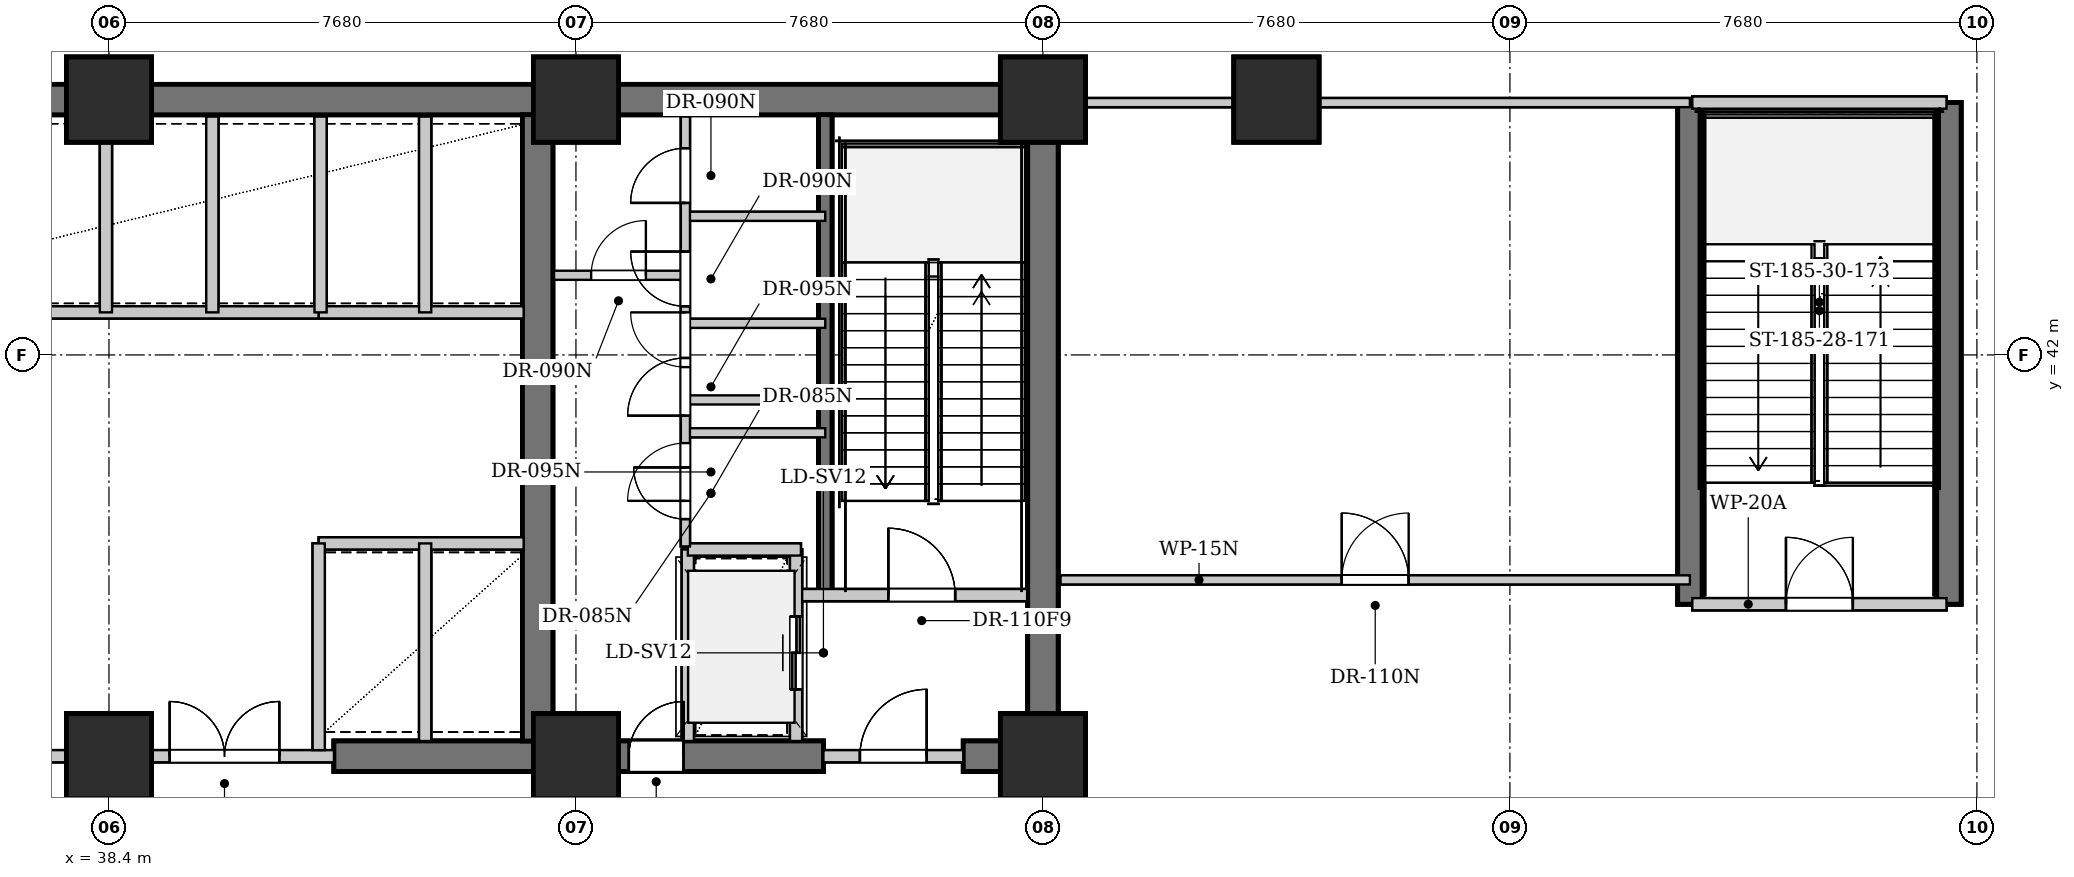
"""IFC4 building model, lengths in metres.
Left out: names, types, materials, properties, quantities, classifications, styles, units other than length and angle.
Written with IfcOpenShell. Run it as: python <this file> out.ifc"""

import sys

from ifc_helpers import new_model, si_unit, direction, frame, frame_2d, origin, origin_2d, place, context, subcontext, project, spatial, rectangle, extrude, element, fill, save


model = new_model("IFC4")
c1 = context("Model", 3, precision=1e-05, world=origin(), true_north=direction((0.0, 1.0)))
c2 = subcontext(c1, "Body", "Model", "MODEL_VIEW")
j1 = project(units=[si_unit("LENGTHUNIT", "METRE"), si_unit("PLANEANGLEUNIT", "RADIAN")], contexts=[c1])
p1 = place(None, origin())
s1 = spatial("IfcSite", under=j1, at=p1, CompositionType="ELEMENT")
p2 = place(p1, origin())
s2 = spatial("IfcBuilding", under=s1, at=p2, CompositionType="ELEMENT")
p3 = place(p2, frame((0.0, 0.0, 10.4)))
s3 = spatial("IfcBuildingStorey", under=s2, at=p3, CompositionType="ELEMENT", Elevation=10.4)
p4 = place(p3, frame((22.79, 46.2, 0.0), z_axis=(0.0, 0.0, 1.0), x_axis=(1.0, 0.0, 0.0)))
e1 = element("IfcWall", 1, at=p4, inside=s3, PredefinedType="SHEAR", context=c2, shape_type="SweptSolid", body=[
    extrude(rectangle(XDim=31.22, YDim=0.5, at=frame_2d((15.61, 0.0))), origin(), (0.0, 0.0, 1.0), 4.94),
])
p5 = place(p3, frame((42.1, 35.4, 0.0), z_axis=(0.0, 0.0, 1.0), x_axis=(1.0, 0.0, 0.0)))
e2 = element("IfcWall", 2, at=p5, inside=s3, PredefinedType="SHEAR", context=c2, shape_type="SweptSolid", body=[
    extrude(rectangle(XDim=8.05, YDim=0.5, at=frame_2d((4.025, 0.0))), origin(), (0.0, 0.0, 1.0), 4.94),
])
p6 = place(p5, frame((4.85, 0.0, 0.0)))
e3 = element("IfcOpeningElement", 3, at=p6, cuts=e2, PredefinedType="OPENING", context=c2, shape_type="SweptSolid", body=[
    extrude(rectangle(XDim=0.9, YDim=2.15, at=frame_2d((0.45, 1.075))), frame((0.0, 0.26, 0.0), z_axis=(0.0, -1.0, 0.0), x_axis=(1.0, 0.0, 0.0)), (0.0, 0.0, 1.0), 0.52),
])
p7 = place(p3, frame((52.45, 35.4, 0.0), z_axis=(0.0, 0.0, 1.0), x_axis=(1.0, 0.0, 0.0)))
e4 = element("IfcWall", 4, at=p7, inside=s3, PredefinedType="SHEAR", context=c2, shape_type="SweptSolid", body=[
    extrude(rectangle(XDim=1.56, YDim=0.5, at=frame_2d((0.78, 0.0))), origin(), (0.0, 0.0, 1.0), 4.94),
])
for number, where, z_axis, x_axis in (
    (5, (45.45, 35.65, 0.0), (0.0, 0.0, 1.0), (0.0, 1.0, 0.0)),
    (6, (53.76, 35.65, 0.0), (0.0, 0.0, 1.0), (0.0, 1.0, 0.0)),
):
    element("IfcWall", number, at=place(p3, frame(where, z_axis=z_axis, x_axis=x_axis)), inside=s3, PredefinedType="SHEAR", context=c2, shape_type="SweptSolid", body=[
        extrude(rectangle(XDim=10.3, YDim=0.5, at=frame_2d((5.15, 0.0))), origin(), (0.0, 0.0, 1.0), 4.94),
    ])
p8 = place(p3, frame((50.18, 38.05, 0.0), z_axis=(0.0, 0.0, 1.0), x_axis=(0.0, 1.0, 0.0)))
e7 = element("IfcWall", 7, at=p8, inside=s3, PredefinedType="SHEAR", context=c2, shape_type="SweptSolid", body=[
    extrude(rectangle(XDim=7.9, YDim=0.22, at=frame_2d((3.95, 0.0))), origin(), (0.0, 0.0, 1.0), 4.94),
])
for number, where, z_axis, x_axis in (
    (8, (64.4, 37.9, 0.0), (0.0, 0.0, 1.0), (0.0, 1.0, 0.0)),
    (9, (68.66, 37.9, 0.0), (0.0, 0.0, 1.0), (0.0, 1.0, 0.0)),
):
    element("IfcWall", number, at=place(p3, frame(where, z_axis=z_axis, x_axis=x_axis)), inside=s3, PredefinedType="SHEAR", context=c2, shape_type="SweptSolid", body=[
        extrude(rectangle(XDim=8.25, YDim=0.4, at=frame_2d((4.125, 0.0))), origin(), (0.0, 0.0, 1.0), 4.94),
    ])
for number, where, z_axis, x_axis in (
    (10, (38.4, 35.4, 0.0), (0.0, 0.0, 1.0), (1.0, 0.0, 0.0)),
    (11, (38.4, 46.2, 0.0), (0.0, 0.0, 1.0), (1.0, 0.0, 0.0)),
    (12, (46.08, 35.4, 0.0), (0.0, 0.0, 1.0), (1.0, 0.0, 0.0)),
    (13, (46.08, 46.2, 0.0), (0.0, 0.0, 1.0), (1.0, 0.0, 0.0)),
    (14, (53.76, 35.4, 0.0), (0.0, 0.0, 1.0), (1.0, 0.0, 0.0)),
    (15, (53.76, 46.2, 0.0), (0.0, 0.0, 1.0), (1.0, 0.0, 0.0)),
    (16, (57.6, 46.2, 0.0), (0.0, 0.0, 1.0), (1.0, 0.0, 0.0)),
):
    element("IfcColumn", number, at=place(p3, frame(where, z_axis=z_axis, x_axis=x_axis)), inside=s3, PredefinedType="COLUMN", context=c2, shape_type="SweptSolid", body=[
        extrude(rectangle(XDim=1.4, YDim=1.4, at=origin_2d()), origin(), (0.0, 0.0, 1.0), 5.2),
    ])
p9 = place(p3, frame((35.6, 35.4, 0.0), z_axis=(0.0, 0.0, 1.0), x_axis=(1.0, 0.0, 0.0)))
e17 = element("IfcWall", 17, at=p9, inside=s3, PredefinedType="PARTITIONING", context=c2, shape_type="SweptSolid", body=[
    extrude(rectangle(XDim=6.5, YDim=0.2, at=frame_2d((3.25, 0.0))), origin(), (0.0, 0.0, 1.0), 4.035),
])
p10 = place(p9, frame((3.8, 0.0, 0.0)))
e18 = element("IfcOpeningElement", 18, at=p10, cuts=e17, PredefinedType="OPENING", context=c2, shape_type="SweptSolid", body=[
    extrude(rectangle(XDim=1.8, YDim=2.3, at=frame_2d((0.9, 1.15))), frame((0.0, 0.11, 0.0), z_axis=(0.0, -1.0, 0.0), x_axis=(1.0, 0.0, 0.0)), (0.0, 0.0, 1.0), 0.22),
])
p11 = place(p3, frame((36.6, 42.7, 0.0), z_axis=(0.0, 0.0, 1.0), x_axis=(1.0, 0.0, 0.0)))
e19 = element("IfcWall", 19, at=p11, inside=s3, PredefinedType="PARTITIONING", context=c2, shape_type="SweptSolid", body=[
    extrude(rectangle(XDim=5.25, YDim=0.2, at=frame_2d((2.625, 0.0))), origin(), (0.0, 0.0, 1.0), 4.94),
])
p12 = place(p3, frame((38.35, 42.7, 0.0), z_axis=(0.0, 0.0, 1.0), x_axis=(0.0, 1.0, 0.0)))
e20 = element("IfcWall", 20, at=p12, inside=s3, PredefinedType="PARTITIONING", context=c2, shape_type="SweptSolid", body=[
    extrude(rectangle(XDim=3.22, YDim=0.2, at=frame_2d((1.61, 0.0))), origin(), (0.0, 0.0, 1.0), 4.035),
])
p13 = place(p3, frame((40.1, 42.7, 0.0), z_axis=(0.0, 0.0, 1.0), x_axis=(0.0, 1.0, 0.0)))
e21 = element("IfcWall", 21, at=p13, inside=s3, PredefinedType="PARTITIONING", context=c2, shape_type="SweptSolid", body=[
    extrude(rectangle(XDim=3.22, YDim=0.2, at=frame_2d((1.61, 0.0))), origin(), (0.0, 0.0, 1.0), 4.94),
])
for number, where, z_axis, x_axis in (
    (22, (41.85, 38.9, 0.0), (0.0, 0.0, 1.0), (1.0, 0.0, 0.0)),
    (23, (41.85, 42.7, 0.0), (0.0, 0.0, 1.0), (1.0, 0.0, 0.0)),
):
    element("IfcWall", number, at=place(p3, frame(where, z_axis=z_axis, x_axis=x_axis)), inside=s3, PredefinedType="PARTITIONING", context=c2, shape_type="SweptSolid", body=[
        extrude(rectangle(XDim=3.37, YDim=0.2, at=frame_2d((1.685, 0.0))), origin(), (0.0, 0.0, 1.0), 4.94),
    ])
p14 = place(p3, frame((43.6, 35.65, 0.0), z_axis=(0.0, 0.0, 1.0), x_axis=(0.0, 1.0, 0.0)))
e24 = element("IfcWall", 24, at=p14, inside=s3, PredefinedType="PARTITIONING", context=c2, shape_type="SweptSolid", body=[
    extrude(rectangle(XDim=3.25, YDim=0.2, at=frame_2d((1.625, 0.0))), origin(), (0.0, 0.0, 1.0), 4.94),
])
p15 = place(p3, frame((43.6, 42.7, 0.0), z_axis=(0.0, 0.0, 1.0), x_axis=(0.0, 1.0, 0.0)))
e25 = element("IfcWall", 25, at=p15, inside=s3, PredefinedType="PARTITIONING", context=c2, shape_type="SweptSolid", body=[
    extrude(rectangle(XDim=3.22, YDim=0.2, at=frame_2d((1.61, 0.0))), origin(), (0.0, 0.0, 1.0), 4.94),
])
p16 = place(p3, frame((41.85, 35.5, 0.0), z_axis=(0.0, 0.0, 1.0), x_axis=(0.0, 1.0, 0.0)))
e26 = element("IfcWall", 26, at=p16, inside=s3, PredefinedType="PARTITIONING", context=c2, shape_type="SweptSolid", body=[
    extrude(rectangle(XDim=3.4, YDim=0.2, at=frame_2d((1.7, 0.0))), origin(), (0.0, 0.0, 1.0), 4.94),
])
p17 = place(p3, frame((41.88, 42.7, 0.0), z_axis=(0.0, 0.0, 1.0), x_axis=(0.0, 1.0, 0.0)))
e27 = element("IfcWall", 27, at=p17, inside=s3, PredefinedType="PARTITIONING", context=c2, shape_type="SweptSolid", body=[
    extrude(rectangle(XDim=3.22, YDim=0.2, at=frame_2d((1.61, 0.0))), origin(), (0.0, 0.0, 1.0), 4.94),
])
p18 = place(p3, frame((49.78, 38.05, 0.0), z_axis=(0.0, 0.0, 1.0), x_axis=(1.0, 0.0, 0.0)))
e28 = element("IfcWall", 28, at=p18, inside=s3, PredefinedType="PARTITIONING", context=c2, shape_type="SweptSolid", body=[
    extrude(rectangle(XDim=3.72, YDim=0.2, at=frame_2d((1.86, 0.0))), origin(), (0.0, 0.0, 1.0), 4.94),
])
p19 = place(p18, frame((1.436, 0.0, 0.0)))
e29 = element("IfcOpeningElement", 29, at=p19, cuts=e28, PredefinedType="OPENING", context=c2, shape_type="SweptSolid", body=[
    extrude(rectangle(XDim=1.1, YDim=2.15, at=frame_2d((0.55, 1.075))), frame((0.0, 0.11, 0.0), z_axis=(0.0, -1.0, 0.0), x_axis=(1.0, 0.0, 0.0)), (0.0, 0.0, 1.0), 0.22),
])
p20 = place(p3, frame((50.15, 35.4, 0.0), z_axis=(0.0, 0.0, 1.0), x_axis=(1.0, 0.0, 0.0)))
e30 = element("IfcWall", 30, at=p20, inside=s3, PredefinedType="PARTITIONING", context=c2, shape_type="SweptSolid", body=[
    extrude(rectangle(XDim=2.3, YDim=0.2, at=frame_2d((1.15, 0.0))), origin(), (0.0, 0.0, 1.0), 4.035),
])
p21 = place(p20, frame((0.6, 0.0, 0.0)))
e31 = element("IfcOpeningElement", 31, at=p21, cuts=e30, PredefinedType="OPENING", context=c2, shape_type="SweptSolid", body=[
    extrude(rectangle(XDim=1.1, YDim=2.15, at=frame_2d((0.55, 1.075))), frame((0.0, 0.11, 0.0), z_axis=(0.0, -1.0, 0.0), x_axis=(1.0, 0.0, 0.0)), (0.0, 0.0, 1.0), 0.22),
])
p22 = place(p3, frame((49.7, 35.65, 0.0), z_axis=(0.0, 0.0, 1.0), x_axis=(0.0, 1.0, 0.0)))
e32 = element("IfcWall", 32, at=p22, inside=s3, PredefinedType="PARTITIONING", context=c2, shape_type="SweptSolid", body=[
    extrude(rectangle(XDim=3.15, YDim=0.2, at=frame_2d((1.575, 0.0))), origin(), (0.0, 0.0, 1.0), 4.94),
])
p23 = place(p22, frame((0.85, 0.0, 0.0)))
e33 = element("IfcOpeningElement", 33, at=p23, cuts=e32, PredefinedType="OPENING", context=c2, shape_type="SweptSolid", body=[
    extrude(rectangle(XDim=1.2, YDim=2.2, at=frame_2d((0.6, 1.1))), frame((0.0, 0.11, 0.0), z_axis=(0.0, -1.0, 0.0), x_axis=(1.0, 0.0, 0.0)), (0.0, 0.0, 1.0), 0.22),
])
p24 = place(p3, frame((47.92, 35.65, 0.0), z_axis=(0.0, 0.0, 1.0), x_axis=(0.0, 1.0, 0.0)))
e34 = element("IfcWall", 34, at=p24, inside=s3, PredefinedType="PARTITIONING", context=c2, shape_type="SweptSolid", body=[
    extrude(rectangle(XDim=3.15, YDim=0.2, at=frame_2d((1.575, 0.0))), origin(), (0.0, 0.0, 1.0), 4.94),
])
p25 = place(p3, frame((47.92, 38.8, 0.0), z_axis=(0.0, 0.0, 1.0), x_axis=(1.0, 0.0, 0.0)))
e35 = element("IfcWall", 35, at=p25, inside=s3, PredefinedType="PARTITIONING", context=c2, shape_type="SweptSolid", body=[
    extrude(rectangle(XDim=1.86, YDim=0.2, at=frame_2d((0.93, 0.0))), origin(), (0.0, 0.0, 1.0), 4.94),
])
for number, where, z_axis, x_axis in (
    (36, (47.88, 40.72, 0.0), (0.0, 0.0, 1.0), (1.0, 0.0, 0.0)),
    (37, (47.88, 42.52, 0.0), (0.0, 0.0, 1.0), (1.0, 0.0, 0.0)),
    (38, (47.88, 44.28, 0.0), (0.0, 0.0, 1.0), (1.0, 0.0, 0.0)),
):
    element("IfcWall", number, at=place(p3, frame(where, z_axis=z_axis, x_axis=x_axis)), inside=s3, PredefinedType="PARTITIONING", context=c2, shape_type="SweptSolid", body=[
        extrude(rectangle(XDim=2.3, YDim=0.15, at=frame_2d((1.15, 0.0))), origin(), (0.0, 0.0, 1.0), 4.94),
    ])
p26 = place(p3, frame((47.88, 38.85, 0.0), z_axis=(0.0, 0.0, 1.0), x_axis=(0.0, 1.0, 0.0)))
e39 = element("IfcWall", 39, at=p26, inside=s3, PredefinedType="PARTITIONING", context=c2, shape_type="SweptSolid", body=[
    extrude(rectangle(XDim=7.07, YDim=0.15, at=frame_2d((3.535, 0.0))), origin(), (0.0, 0.0, 1.0), 4.94),
])
p27 = place(p26, frame((0.45, 0.0, 0.0)))
e40 = element("IfcOpeningElement", 40, at=p27, cuts=e39, PredefinedType="OPENING", context=c2, shape_type="SweptSolid", body=[
    extrude(rectangle(XDim=0.85, YDim=2.15, at=frame_2d((0.425, 1.075))), frame((0.0, 0.085, 0.0), z_axis=(0.0, -1.0, 0.0), x_axis=(1.0, 0.0, 0.0)), (0.0, 0.0, 1.0), 0.17),
])
p28 = place(p26, frame((2.15, 0.0, 0.0)))
e41 = element("IfcOpeningElement", 41, at=p28, cuts=e39, PredefinedType="OPENING", context=c2, shape_type="SweptSolid", body=[
    extrude(rectangle(XDim=0.95, YDim=2.15, at=frame_2d((0.475, 1.075))), frame((0.0, 0.085, 0.0), z_axis=(0.0, -1.0, 0.0), x_axis=(1.0, 0.0, 0.0)), (0.0, 0.0, 1.0), 0.17),
])
p29 = place(p26, frame((3.95, 0.0, 0.0)))
e42 = element("IfcOpeningElement", 42, at=p29, cuts=e39, PredefinedType="OPENING", context=c2, shape_type="SweptSolid", body=[
    extrude(rectangle(XDim=0.9, YDim=2.15, at=frame_2d((0.45, 1.075))), frame((0.0, 0.085, 0.0), z_axis=(0.0, -1.0, 0.0), x_axis=(1.0, 0.0, 0.0)), (0.0, 0.0, 1.0), 0.17),
])
p30 = place(p26, frame((5.65, 0.0, 0.0)))
e43 = element("IfcOpeningElement", 43, at=p30, cuts=e39, PredefinedType="OPENING", context=c2, shape_type="SweptSolid", body=[
    extrude(rectangle(XDim=0.9, YDim=2.15, at=frame_2d((0.45, 1.075))), frame((0.0, 0.085, 0.0), z_axis=(0.0, -1.0, 0.0), x_axis=(1.0, 0.0, 0.0)), (0.0, 0.0, 1.0), 0.17),
])
p31 = place(p3, frame((64.44, 37.9, 0.0), z_axis=(0.0, 0.0, 1.0), x_axis=(1.0, 0.0, 0.0)))
e44 = element("IfcWall", 44, at=p31, inside=s3, PredefinedType="PARTITIONING", context=c2, shape_type="SweptSolid", body=[
    extrude(rectangle(XDim=4.18, YDim=0.2, at=frame_2d((2.09, 0.0))), origin(), (0.0, 0.0, 1.0), 4.94),
])
p32 = place(p31, frame((1.54, 0.0, 0.0)))
e45 = element("IfcOpeningElement", 45, at=p32, cuts=e44, PredefinedType="OPENING", context=c2, shape_type="SweptSolid", body=[
    extrude(rectangle(XDim=1.1, YDim=2.15, at=frame_2d((0.55, 1.075))), frame((0.0, 0.11, 0.0), z_axis=(0.0, -1.0, 0.0), x_axis=(1.0, 0.0, 0.0)), (0.0, 0.0, 1.0), 0.22),
])
p33 = place(p3, frame((64.44, 46.15, 0.0), z_axis=(0.0, 0.0, 1.0), x_axis=(1.0, 0.0, 0.0)))
e46 = element("IfcWall", 46, at=p33, inside=s3, PredefinedType="PARTITIONING", context=c2, shape_type="SweptSolid", body=[
    extrude(rectangle(XDim=4.18, YDim=0.2, at=frame_2d((2.09, 0.0))), origin(), (0.0, 0.0, 1.0), 4.94),
])
p34 = place(p3, frame((54.05, 38.3, 0.0), z_axis=(0.0, 0.0, 1.0), x_axis=(1.0, 0.0, 0.0)))
e47 = element("IfcWall", 47, at=p34, inside=s3, PredefinedType="PARTITIONING", context=c2, shape_type="SweptSolid", body=[
    extrude(rectangle(XDim=10.35, YDim=0.15, at=frame_2d((5.175, 0.0))), origin(), (0.0, 0.0, 1.0), 4.94),
])
p35 = place(p34, frame((4.625, 0.0, 0.0)))
e48 = element("IfcOpeningElement", 48, at=p35, cuts=e47, PredefinedType="OPENING", context=c2, shape_type="SweptSolid", body=[
    extrude(rectangle(XDim=1.1, YDim=2.15, at=frame_2d((0.55, 1.075))), frame((0.0, 0.085, 0.0), z_axis=(0.0, -1.0, 0.0), x_axis=(1.0, 0.0, 0.0)), (0.0, 0.0, 1.0), 0.17),
])
p36 = place(p3, frame((54.05, 46.15, 0.0), z_axis=(0.0, 0.0, 1.0), x_axis=(1.0, 0.0, 0.0)))
e49 = element("IfcWall", 49, at=p36, inside=s3, PredefinedType="PARTITIONING", context=c2, shape_type="SweptSolid", body=[
    extrude(rectangle(XDim=10.35, YDim=0.15, at=frame_2d((5.175, 0.0))), origin(), (0.0, 0.0, 1.0), 4.94),
])
p37 = place(p10, origin())
e50 = element("IfcDoor", 50, at=p37, inside=s3, OperationType="DOUBLE_DOOR_SINGLE_SWING", PredefinedType="DOOR", context=c2, shape_type="SweptSolid", body=[
    extrude(rectangle(XDim=1.8, YDim=2.3, at=frame_2d((0.9, 1.15))), frame((0.0, 0.025, 0.0), z_axis=(0.0, -1.0, 0.0), x_axis=(1.0, 0.0, 0.0)), (0.0, 0.0, 1.0), 0.05),
])
fill(e18, e50)
p38 = place(p19, origin())
e51 = element("IfcDoor", 51, at=p38, inside=s3, OperationType="SINGLE_SWING_LEFT", PredefinedType="DOOR", context=c2, shape_type="SweptSolid", body=[
    extrude(rectangle(XDim=1.1, YDim=2.15, at=frame_2d((0.55, 1.075))), frame((0.0, 0.025, 0.0), z_axis=(0.0, -1.0, 0.0), x_axis=(1.0, 0.0, 0.0)), (0.0, 0.0, 1.0), 0.05),
])
fill(e29, e51)
p39 = place(p21, origin())
e52 = element("IfcDoor", 52, at=p39, inside=s3, OperationType="SINGLE_SWING_RIGHT", PredefinedType="DOOR", context=c2, shape_type="SweptSolid", body=[
    extrude(rectangle(XDim=1.1, YDim=2.15, at=frame_2d((0.55, 1.075))), frame((0.0, 0.025, 0.0), z_axis=(0.0, -1.0, 0.0), x_axis=(1.0, 0.0, 0.0)), (0.0, 0.0, 1.0), 0.05),
])
fill(e31, e52)
p40 = place(p23, origin())
e53 = element("IfcDoor", 53, at=p40, inside=s3, OperationType="DOUBLE_DOOR_SLIDING", PredefinedType="DOOR", context=c2, shape_type="SweptSolid", body=[
    extrude(rectangle(XDim=1.2, YDim=2.2, at=frame_2d((0.6, 1.1))), frame((0.0, 0.025, 0.0), z_axis=(0.0, -1.0, 0.0), x_axis=(1.0, 0.0, 0.0)), (0.0, 0.0, 1.0), 0.05),
])
fill(e33, e53)
p41 = place(p27, origin())
e54 = element("IfcDoor", 54, at=p41, inside=s3, OperationType="SINGLE_SWING_RIGHT", PredefinedType="DOOR", context=c2, shape_type="SweptSolid", body=[
    extrude(rectangle(XDim=0.85, YDim=2.15, at=frame_2d((0.425, 1.075))), frame((0.0, 0.025, 0.0), z_axis=(0.0, -1.0, 0.0), x_axis=(1.0, 0.0, 0.0)), (0.0, 0.0, 1.0), 0.05),
])
fill(e40, e54)
p42 = place(p28, origin())
e55 = element("IfcDoor", 55, at=p42, inside=s3, OperationType="SINGLE_SWING_LEFT", PredefinedType="DOOR", context=c2, shape_type="SweptSolid", body=[
    extrude(rectangle(XDim=0.95, YDim=2.15, at=frame_2d((0.475, 1.075))), frame((0.0, 0.025, 0.0), z_axis=(0.0, -1.0, 0.0), x_axis=(1.0, 0.0, 0.0)), (0.0, 0.0, 1.0), 0.05),
])
fill(e41, e55)
p43 = place(p29, origin())
e56 = element("IfcDoor", 56, at=p43, inside=s3, OperationType="SINGLE_SWING_RIGHT", PredefinedType="DOOR", context=c2, shape_type="SweptSolid", body=[
    extrude(rectangle(XDim=0.9, YDim=2.15, at=frame_2d((0.45, 1.075))), frame((0.0, 0.025, 0.0), z_axis=(0.0, -1.0, 0.0), x_axis=(1.0, 0.0, 0.0)), (0.0, 0.0, 1.0), 0.05),
])
fill(e42, e56)
p44 = place(p30, origin())
e57 = element("IfcDoor", 57, at=p44, inside=s3, OperationType="SINGLE_SWING_LEFT", PredefinedType="DOOR", context=c2, shape_type="SweptSolid", body=[
    extrude(rectangle(XDim=0.9, YDim=2.15, at=frame_2d((0.45, 1.075))), frame((0.0, 0.025, 0.0), z_axis=(0.0, -1.0, 0.0), x_axis=(1.0, 0.0, 0.0)), (0.0, 0.0, 1.0), 0.05),
])
fill(e43, e57)
p45 = place(p32, origin())
e58 = element("IfcDoor", 58, at=p45, inside=s3, OperationType="SINGLE_SWING_LEFT", PredefinedType="DOOR", context=c2, shape_type="SweptSolid", body=[
    extrude(rectangle(XDim=1.1, YDim=2.15, at=frame_2d((0.55, 1.075))), frame((0.0, 0.025, 0.0), z_axis=(0.0, -1.0, 0.0), x_axis=(1.0, 0.0, 0.0)), (0.0, 0.0, 1.0), 0.05),
])
fill(e45, e58)
p46 = place(p35, origin())
e59 = element("IfcDoor", 59, at=p46, inside=s3, OperationType="SINGLE_SWING_LEFT", PredefinedType="DOOR", context=c2, shape_type="SweptSolid", body=[
    extrude(rectangle(XDim=1.1, YDim=2.15, at=frame_2d((0.55, 1.075))), frame((0.0, 0.025, 0.0), z_axis=(0.0, -1.0, 0.0), x_axis=(1.0, 0.0, 0.0)), (0.0, 0.0, 1.0), 0.05),
])
fill(e48, e59)
p47 = place(p6, origin())
e60 = element("IfcDoor", 60, at=p47, inside=s3, OperationType="SINGLE_SWING_RIGHT", PredefinedType="DOOR", context=c2, shape_type="SweptSolid", body=[
    extrude(rectangle(XDim=0.9, YDim=2.15, at=frame_2d((0.45, 1.075))), frame((0.0, 0.025, 0.0), z_axis=(0.0, -1.0, 0.0), x_axis=(1.0, 0.0, 0.0)), (0.0, 0.0, 1.0), 0.05),
])
fill(e3, e60)
save(model, sys.argv[1])
